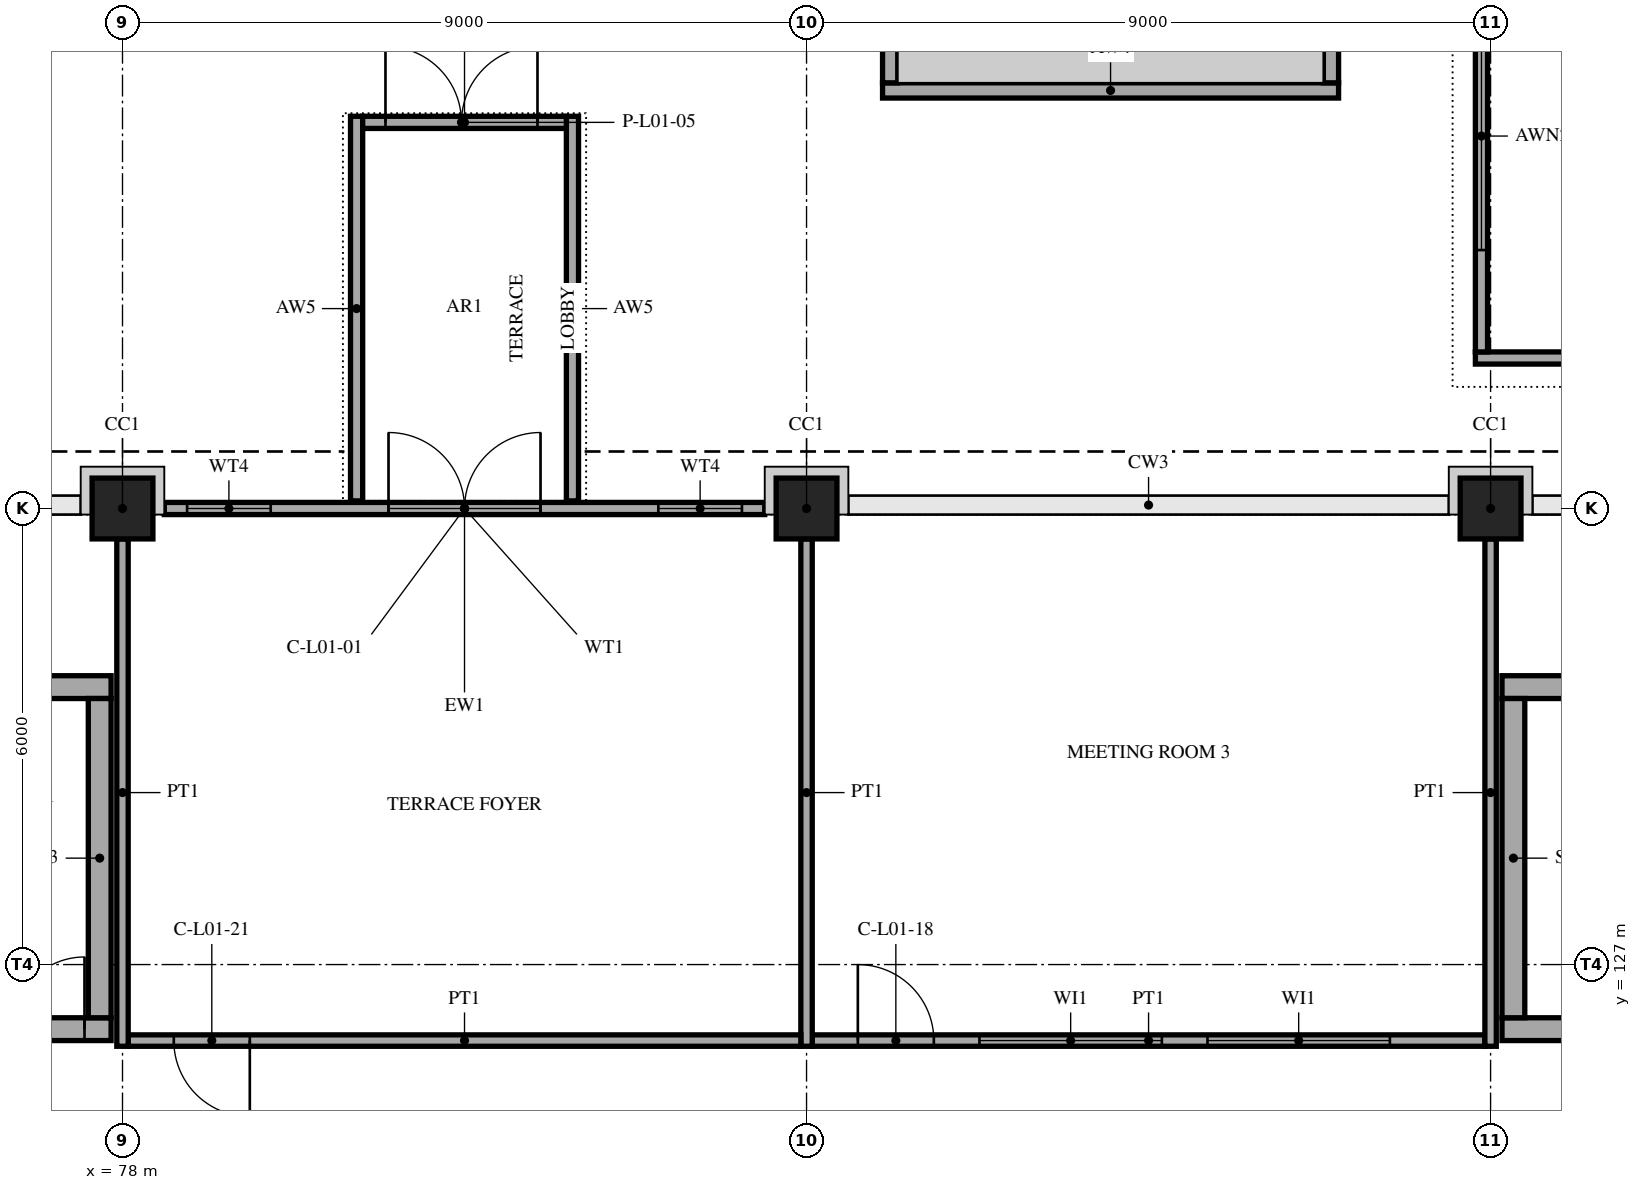
"""IFC4 building model, lengths in metres.
Left out: names, types, materials, properties, quantities, classifications, styles, units other than length and angle.
Written with IfcOpenShell. Run it as: python <this file> out.ifc"""

import sys

from ifc_helpers import new_model, si_unit, direction, frame, frame_2d, origin, origin_2d, place, context, subcontext, project, spatial, rectangle, extrude, element, fill, save


model = new_model("IFC4")
c1 = context("Model", 3, precision=1e-05, world=origin(), true_north=direction((0.0, 1.0)))
c2 = subcontext(c1, "Body", "Model", "MODEL_VIEW")
j1 = project(units=[si_unit("LENGTHUNIT", "METRE"), si_unit("PLANEANGLEUNIT", "RADIAN")], contexts=[c1])
p1 = place(None, origin())
s1 = spatial("IfcSite", under=j1, at=p1, CompositionType="ELEMENT")
p2 = place(p1, origin())
s2 = spatial("IfcBuilding", under=s1, at=p2, CompositionType="ELEMENT")
p3 = place(p2, frame((0.0, 0.0, 5.0)))
s3 = spatial("IfcBuildingStorey", under=s2, at=p3, CompositionType="ELEMENT", Elevation=5.0)
for number, where, z_axis, x_axis in (
    (1, (78.0, 133.0, 0.0), (0.0, 0.0, 1.0), (1.0, 0.0, 0.0)),
    (2, (87.0, 133.0, 0.0), (0.0, 0.0, 1.0), (1.0, 0.0, 0.0)),
    (3, (96.0, 133.0, 0.0), (0.0, 0.0, 1.0), (1.0, 0.0, 0.0)),
):
    element("IfcColumn", number, at=place(p3, frame(where, z_axis=z_axis, x_axis=x_axis)), inside=s3, PredefinedType="COLUMN", context=c2, shape_type="SweptSolid", body=[
        extrude(rectangle(XDim=0.8, YDim=0.8, at=origin_2d()), origin(), (0.0, 0.0, 1.0), 5.0),
    ])
p4 = place(p3, frame((69.15, 126.15, 0.0), z_axis=(0.0, 0.0, 1.0), x_axis=(1.0, 0.0, 0.0)))
e4 = element("IfcWall", 4, at=p4, inside=s3, PredefinedType="SHEAR", context=c2, shape_type="SweptSolid", body=[
    extrude(rectangle(XDim=8.7, YDim=0.3, at=frame_2d((4.35, 0.0))), origin(), (0.0, 0.0, 1.0), 5.0),
])
p5 = place(p4, frame((6.45, 0.0, 0.0)))
e5 = element("IfcOpeningElement", 5, at=p5, cuts=e4, PredefinedType="OPENING", context=c2, shape_type="SweptSolid", body=[
    extrude(rectangle(XDim=1.9, YDim=2.1, at=frame_2d((0.95, 1.05))), frame((0.0, 0.16, 0.0), z_axis=(0.0, -1.0, 0.0), x_axis=(1.0, 0.0, 0.0)), (0.0, 0.0, 1.0), 0.32),
])
p6 = place(p3, frame((69.15, 130.65, 0.0), z_axis=(0.0, 0.0, 1.0), x_axis=(1.0, 0.0, 0.0)))
e6 = element("IfcWall", 6, at=p6, inside=s3, PredefinedType="SHEAR", context=c2, shape_type="SweptSolid", body=[
    extrude(rectangle(XDim=8.7, YDim=0.3, at=frame_2d((4.35, 0.0))), origin(), (0.0, 0.0, 1.0), 5.0),
])
p7 = place(p3, frame((77.7, 126.3, 0.0), z_axis=(0.0, 0.0, 1.0), x_axis=(0.0, 1.0, 0.0)))
e7 = element("IfcWall", 7, at=p7, inside=s3, PredefinedType="SHEAR", context=c2, shape_type="SweptSolid", body=[
    extrude(rectangle(XDim=4.2, YDim=0.3, at=frame_2d((2.1, 0.0))), origin(), (0.0, 0.0, 1.0), 5.0),
])
p8 = place(p3, frame((96.15, 126.15, 0.0), z_axis=(0.0, 0.0, 1.0), x_axis=(1.0, 0.0, 0.0)))
e8 = element("IfcWall", 8, at=p8, inside=s3, PredefinedType="SHEAR", context=c2, shape_type="SweptSolid", body=[
    extrude(rectangle(XDim=8.2, YDim=0.3, at=frame_2d((4.1, 0.0))), origin(), (0.0, 0.0, 1.0), 5.0),
])
p9 = place(p8, frame((5.95, 0.0, 0.0)))
e9 = element("IfcOpeningElement", 9, at=p9, cuts=e8, PredefinedType="OPENING", context=c2, shape_type="SweptSolid", body=[
    extrude(rectangle(XDim=1.9, YDim=2.1, at=frame_2d((0.95, 1.05))), frame((0.0, 0.16, 0.0), z_axis=(0.0, -1.0, 0.0), x_axis=(1.0, 0.0, 0.0)), (0.0, 0.0, 1.0), 0.32),
])
p10 = place(p3, frame((96.15, 130.65, 0.0), z_axis=(0.0, 0.0, 1.0), x_axis=(1.0, 0.0, 0.0)))
e10 = element("IfcWall", 10, at=p10, inside=s3, PredefinedType="SHEAR", context=c2, shape_type="SweptSolid", body=[
    extrude(rectangle(XDim=8.2, YDim=0.3, at=frame_2d((4.1, 0.0))), origin(), (0.0, 0.0, 1.0), 5.0),
])
p11 = place(p3, frame((96.3, 126.3, 0.0), z_axis=(0.0, 0.0, 1.0), x_axis=(0.0, 1.0, 0.0)))
e11 = element("IfcWall", 11, at=p11, inside=s3, PredefinedType="SHEAR", context=c2, shape_type="SweptSolid", body=[
    extrude(rectangle(XDim=4.2, YDim=0.3, at=frame_2d((2.1, 0.0))), origin(), (0.0, 0.0, 1.0), 5.0),
])
p12 = place(p3, frame((78.55, 133.0, 0.0), z_axis=(0.0, 0.0, 1.0), x_axis=(1.0, 0.0, 0.0)))
e12 = element("IfcWall", 12, at=p12, inside=s3, PredefinedType="STANDARD", context=c2, shape_type="SweptSolid", body=[
    extrude(rectangle(XDim=7.9, YDim=0.16, at=frame_2d((3.95, 0.0))), origin(), (0.0, 0.0, 1.0), 5.0),
])
p13 = place(p12, frame((2.95, 0.0, 0.0)))
e13 = element("IfcOpeningElement", 13, at=p13, cuts=e12, PredefinedType="OPENING", context=c2, shape_type="SweptSolid", body=[
    extrude(rectangle(XDim=2.0, YDim=2.4, at=frame_2d((1.0, 1.2))), frame((0.0, 0.09, 0.0), z_axis=(0.0, -1.0, 0.0), x_axis=(1.0, 0.0, 0.0)), (0.0, 0.0, 1.0), 0.18),
])
p14 = place(p12, frame((2.95, 0.0, 2.6)))
e14 = element("IfcOpeningElement", 14, at=p14, cuts=e12, PredefinedType="OPENING", context=c2, shape_type="SweptSolid", body=[
    extrude(rectangle(XDim=2.0, YDim=2.1, at=frame_2d((1.0, 1.05))), frame((0.0, 0.09, 0.0), z_axis=(0.0, -1.0, 0.0), x_axis=(1.0, 0.0, 0.0)), (0.0, 0.0, 1.0), 0.18),
])
p15 = place(p12, frame((0.3, 0.0, 0.9)))
e15 = element("IfcOpeningElement", 15, at=p15, cuts=e12, PredefinedType="OPENING", context=c2, shape_type="SweptSolid", body=[
    extrude(rectangle(XDim=1.1, YDim=3.8, at=frame_2d((0.55, 1.9))), frame((0.0, 0.09, 0.0), z_axis=(0.0, -1.0, 0.0), x_axis=(1.0, 0.0, 0.0)), (0.0, 0.0, 1.0), 0.18),
])
p16 = place(p12, frame((6.5, 0.0, 0.9)))
e16 = element("IfcOpeningElement", 16, at=p16, cuts=e12, PredefinedType="OPENING", context=c2, shape_type="SweptSolid", body=[
    extrude(rectangle(XDim=1.1, YDim=3.8, at=frame_2d((0.55, 1.9))), frame((0.0, 0.09, 0.0), z_axis=(0.0, -1.0, 0.0), x_axis=(1.0, 0.0, 0.0)), (0.0, 0.0, 1.0), 0.18),
])
p17 = place(p3, frame((88.0, 138.5, 0.0), z_axis=(0.0, 0.0, 1.0), x_axis=(1.0, 0.0, 0.0)))
e17 = element("IfcWall", 17, at=p17, inside=s3, PredefinedType="STANDARD", context=c2, shape_type="SweptSolid", body=[
    extrude(rectangle(XDim=6.0, YDim=0.2, at=frame_2d((3.0, 0.0))), origin(), (0.0, 0.0, 1.0), 0.45),
])
for number, where, z_axis, x_axis in (
    (18, (88.1, 138.6, 0.0), (0.0, 0.0, 1.0), (0.0, 1.0, 0.0)),
    (19, (93.9, 138.6, 0.0), (0.0, 0.0, 1.0), (0.0, 1.0, 0.0)),
):
    element("IfcWall", number, at=place(p3, frame(where, z_axis=z_axis, x_axis=x_axis)), inside=s3, PredefinedType="STANDARD", context=c2, shape_type="SweptSolid", body=[
        extrude(rectangle(XDim=2.6, YDim=0.2, at=frame_2d((1.3, 0.0))), origin(), (0.0, 0.0, 1.0), 0.45),
    ])
p18 = place(p3, frame((95.8, 134.98, 0.0), z_axis=(0.0, 0.0, 1.0), x_axis=(1.0, 0.0, 0.0)))
e20 = element("IfcWall", 20, at=p18, inside=s3, PredefinedType="STANDARD", context=c2, shape_type="SweptSolid", body=[
    extrude(rectangle(XDim=36.4, YDim=0.16, at=frame_2d((18.2, 0.0))), origin(), (0.0, 0.0, 1.0), 2.6),
])
p19 = place(p18, frame((10.7, 0.0, 0.0)))
e21 = element("IfcOpeningElement", 21, at=p19, cuts=e20, PredefinedType="OPENING", context=c2, shape_type="SweptSolid", body=[
    extrude(rectangle(XDim=2.0, YDim=2.4, at=frame_2d((1.0, 1.2))), frame((0.0, 0.09, 0.0), z_axis=(0.0, -1.0, 0.0), x_axis=(1.0, 0.0, 0.0)), (0.0, 0.0, 1.0), 0.18),
])
p20 = place(p18, frame((19.7, 0.0, 0.0)))
e22 = element("IfcOpeningElement", 22, at=p20, cuts=e20, PredefinedType="OPENING", context=c2, shape_type="SweptSolid", body=[
    extrude(rectangle(XDim=2.0, YDim=2.4, at=frame_2d((1.0, 1.2))), frame((0.0, 0.09, 0.0), z_axis=(0.0, -1.0, 0.0), x_axis=(1.0, 0.0, 0.0)), (0.0, 0.0, 1.0), 0.18),
])
p21 = place(p18, frame((2.2, 0.0, 0.8)))
e23 = element("IfcOpeningElement", 23, at=p21, cuts=e20, PredefinedType="OPENING", context=c2, shape_type="SweptSolid", body=[
    extrude(rectangle(XDim=3.0, YDim=2.0, at=frame_2d((1.5, 1.0))), frame((0.0, 0.09, 0.0), z_axis=(0.0, -1.0, 0.0), x_axis=(1.0, 0.0, 0.0)), (0.0, 0.0, 1.0), 0.18),
])
p22 = place(p18, frame((13.7, 0.0, 0.8)))
e24 = element("IfcOpeningElement", 24, at=p22, cuts=e20, PredefinedType="OPENING", context=c2, shape_type="SweptSolid", body=[
    extrude(rectangle(XDim=3.0, YDim=2.0, at=frame_2d((1.5, 1.0))), frame((0.0, 0.09, 0.0), z_axis=(0.0, -1.0, 0.0), x_axis=(1.0, 0.0, 0.0)), (0.0, 0.0, 1.0), 0.18),
])
p23 = place(p18, frame((22.2, 0.0, 0.8)))
e25 = element("IfcOpeningElement", 25, at=p23, cuts=e20, PredefinedType="OPENING", context=c2, shape_type="SweptSolid", body=[
    extrude(rectangle(XDim=3.0, YDim=2.0, at=frame_2d((1.5, 1.0))), frame((0.0, 0.09, 0.0), z_axis=(0.0, -1.0, 0.0), x_axis=(1.0, 0.0, 0.0)), (0.0, 0.0, 1.0), 0.18),
])
p24 = place(p18, frame((27.7, 0.0, 0.8)))
e26 = element("IfcOpeningElement", 26, at=p24, cuts=e20, PredefinedType="OPENING", context=c2, shape_type="SweptSolid", body=[
    extrude(rectangle(XDim=2.5, YDim=2.0, at=frame_2d((1.25, 1.0))), frame((0.0, 0.09, 0.0), z_axis=(0.0, -1.0, 0.0), x_axis=(1.0, 0.0, 0.0)), (0.0, 0.0, 1.0), 0.18),
])
p25 = place(p18, frame((32.7, 0.0, 0.8)))
e27 = element("IfcOpeningElement", 27, at=p25, cuts=e20, PredefinedType="OPENING", context=c2, shape_type="SweptSolid", body=[
    extrude(rectangle(XDim=2.5, YDim=2.0, at=frame_2d((1.25, 1.0))), frame((0.0, 0.09, 0.0), z_axis=(0.0, -1.0, 0.0), x_axis=(1.0, 0.0, 0.0)), (0.0, 0.0, 1.0), 0.18),
])
p26 = place(p3, frame((95.88, 135.06, 0.0), z_axis=(0.0, 0.0, 1.0), x_axis=(0.0, 1.0, 0.0)))
e28 = element("IfcWall", 28, at=p26, inside=s3, PredefinedType="STANDARD", context=c2, shape_type="SweptSolid", body=[
    extrude(rectangle(XDim=8.28, YDim=0.16, at=frame_2d((4.14, 0.0))), origin(), (0.0, 0.0, 1.0), 2.6),
])
p27 = place(p26, frame((1.34, 0.0, 0.8)))
e29 = element("IfcOpeningElement", 29, at=p27, cuts=e28, PredefinedType="OPENING", context=c2, shape_type="SweptSolid", body=[
    extrude(rectangle(XDim=3.0, YDim=2.0, at=frame_2d((1.5, 1.0))), frame((0.0, 0.09, 0.0), z_axis=(0.0, -1.0, 0.0), x_axis=(1.0, 0.0, 0.0)), (0.0, 0.0, 1.0), 0.18),
])
p28 = place(p26, frame((4.79, 0.0, 0.8)))
e30 = element("IfcOpeningElement", 30, at=p28, cuts=e28, PredefinedType="OPENING", context=c2, shape_type="SweptSolid", body=[
    extrude(rectangle(XDim=3.0, YDim=2.0, at=frame_2d((1.5, 1.0))), frame((0.0, 0.09, 0.0), z_axis=(0.0, -1.0, 0.0), x_axis=(1.0, 0.0, 0.0)), (0.0, 0.0, 1.0), 0.18),
])
for number, where, z_axis, x_axis in (
    (31, (81.08, 133.1, 0.0), (0.0, 0.0, 1.0), (0.0, 1.0, 0.0)),
    (32, (83.92, 133.1, 0.0), (0.0, 0.0, 1.0), (0.0, 1.0, 0.0)),
):
    element("IfcWall", number, at=place(p3, frame(where, z_axis=z_axis, x_axis=x_axis)), inside=s3, PredefinedType="STANDARD", context=c2, shape_type="SweptSolid", body=[
        extrude(rectangle(XDim=5.06, YDim=0.16, at=frame_2d((2.53, 0.0))), origin(), (0.0, 0.0, 1.0), 2.6),
    ])
p29 = place(p3, frame((81.16, 138.08, 0.0), z_axis=(0.0, 0.0, 1.0), x_axis=(1.0, 0.0, 0.0)))
e33 = element("IfcWall", 33, at=p29, inside=s3, PredefinedType="STANDARD", context=c2, shape_type="SweptSolid", body=[
    extrude(rectangle(XDim=2.68, YDim=0.16, at=frame_2d((1.34, 0.0))), origin(), (0.0, 0.0, 1.0), 2.6),
])
p30 = place(p29, frame((0.3, 0.0, 0.0)))
e34 = element("IfcOpeningElement", 34, at=p30, cuts=e33, PredefinedType="OPENING", context=c2, shape_type="SweptSolid", body=[
    extrude(rectangle(XDim=2.0, YDim=2.4, at=frame_2d((1.0, 1.2))), frame((0.0, 0.09, 0.0), z_axis=(0.0, -1.0, 0.0), x_axis=(1.0, 0.0, 0.0)), (0.0, 0.0, 1.0), 0.18),
])
p31 = place(p3, frame((87.075, 126.0, 0.0), z_axis=(0.0, 0.0, 1.0), x_axis=(1.0, 0.0, 0.0)))
e35 = element("IfcWall", 35, at=p31, inside=s3, PredefinedType="PARTITIONING", context=c2, shape_type="SweptSolid", body=[
    extrude(rectangle(XDim=8.85, YDim=0.15, at=frame_2d((4.425, 0.0))), origin(), (0.0, 0.0, 1.0), 4.8),
])
p32 = place(p31, frame((0.6, 0.0, 0.0)))
e36 = element("IfcOpeningElement", 36, at=p32, cuts=e35, PredefinedType="OPENING", context=c2, shape_type="SweptSolid", body=[
    extrude(rectangle(XDim=1.0, YDim=2.1, at=frame_2d((0.5, 1.05))), frame((0.0, 0.085, 0.0), z_axis=(0.0, -1.0, 0.0), x_axis=(1.0, 0.0, 0.0)), (0.0, 0.0, 1.0), 0.17),
])
p33 = place(p31, frame((2.2, 0.0, 0.9)))
e37 = element("IfcOpeningElement", 37, at=p33, cuts=e35, PredefinedType="OPENING", context=c2, shape_type="SweptSolid", body=[
    extrude(rectangle(XDim=2.4, YDim=1.5, at=frame_2d((1.2, 0.75))), frame((0.0, 0.085, 0.0), z_axis=(0.0, -1.0, 0.0), x_axis=(1.0, 0.0, 0.0)), (0.0, 0.0, 1.0), 0.17),
])
p34 = place(p31, frame((5.2, 0.0, 0.9)))
e38 = element("IfcOpeningElement", 38, at=p34, cuts=e35, PredefinedType="OPENING", context=c2, shape_type="SweptSolid", body=[
    extrude(rectangle(XDim=2.4, YDim=1.5, at=frame_2d((1.2, 0.75))), frame((0.0, 0.085, 0.0), z_axis=(0.0, -1.0, 0.0), x_axis=(1.0, 0.0, 0.0)), (0.0, 0.0, 1.0), 0.17),
])
for number, where, z_axis, x_axis in (
    (39, (87.0, 125.925, 0.0), (0.0, 0.0, 1.0), (0.0, 1.0, 0.0)),
    (40, (96.0, 125.925, 0.0), (0.0, 0.0, 1.0), (0.0, 1.0, 0.0)),
):
    element("IfcWall", number, at=place(p3, frame(where, z_axis=z_axis, x_axis=x_axis)), inside=s3, PredefinedType="PARTITIONING", context=c2, shape_type="SweptSolid", body=[
        extrude(rectangle(XDim=6.675, YDim=0.15, at=frame_2d((3.337, 0.0))), origin(), (0.0, 0.0, 1.0), 4.0),
    ])
p35 = place(p3, frame((78.075, 126.0, 0.0), z_axis=(0.0, 0.0, 1.0), x_axis=(1.0, 0.0, 0.0)))
e41 = element("IfcWall", 41, at=p35, inside=s3, PredefinedType="PARTITIONING", context=c2, shape_type="SweptSolid", body=[
    extrude(rectangle(XDim=8.85, YDim=0.15, at=frame_2d((4.425, 0.0))), origin(), (0.0, 0.0, 1.0), 4.8),
])
p36 = place(p35, frame((0.6, 0.0, 0.0)))
e42 = element("IfcOpeningElement", 42, at=p36, cuts=e41, PredefinedType="OPENING", context=c2, shape_type="SweptSolid", body=[
    extrude(rectangle(XDim=1.0, YDim=2.1, at=frame_2d((0.5, 1.05))), frame((0.0, 0.085, 0.0), z_axis=(0.0, -1.0, 0.0), x_axis=(1.0, 0.0, 0.0)), (0.0, 0.0, 1.0), 0.17),
])
p37 = place(p3, frame((78.0, 125.925, 0.0), z_axis=(0.0, 0.0, 1.0), x_axis=(0.0, 1.0, 0.0)))
e43 = element("IfcWall", 43, at=p37, inside=s3, PredefinedType="PARTITIONING", context=c2, shape_type="SweptSolid", body=[
    extrude(rectangle(XDim=6.675, YDim=0.15, at=frame_2d((3.337, 0.0))), origin(), (0.0, 0.0, 1.0), 4.0),
])
p38 = place(p13, origin())
e44 = element("IfcDoor", 44, at=p38, inside=s3, OperationType="DOUBLE_DOOR_SINGLE_SWING", PredefinedType="NOTDEFINED", context=c2, shape_type="SweptSolid", body=[
    extrude(rectangle(XDim=2.0, YDim=2.4, at=frame_2d((1.0, 1.2))), frame((0.0, 0.025, 0.0), z_axis=(0.0, -1.0, 0.0), x_axis=(1.0, 0.0, 0.0)), (0.0, 0.0, 1.0), 0.05),
])
fill(e13, e44)
p39 = place(p14, origin())
e45 = element("IfcWindow", 45, at=p39, inside=s3, PartitioningType="SINGLE_PANEL", PredefinedType="WINDOW", context=c2, shape_type="SweptSolid", body=[
    extrude(rectangle(XDim=2.0, YDim=2.1, at=frame_2d((1.0, 1.05))), frame((0.0, 0.03, 0.0), z_axis=(0.0, -1.0, 0.0), x_axis=(1.0, 0.0, 0.0)), (0.0, 0.0, 1.0), 0.06),
])
fill(e14, e45)
p40 = place(p15, origin())
e46 = element("IfcWindow", 46, at=p40, inside=s3, PartitioningType="SINGLE_PANEL", PredefinedType="WINDOW", context=c2, shape_type="SweptSolid", body=[
    extrude(rectangle(XDim=1.1, YDim=3.8, at=frame_2d((0.55, 1.9))), frame((0.0, 0.03, 0.0), z_axis=(0.0, -1.0, 0.0), x_axis=(1.0, 0.0, 0.0)), (0.0, 0.0, 1.0), 0.06),
])
fill(e15, e46)
p41 = place(p16, origin())
e47 = element("IfcWindow", 47, at=p41, inside=s3, PartitioningType="SINGLE_PANEL", PredefinedType="WINDOW", context=c2, shape_type="SweptSolid", body=[
    extrude(rectangle(XDim=1.1, YDim=3.8, at=frame_2d((0.55, 1.9))), frame((0.0, 0.03, 0.0), z_axis=(0.0, -1.0, 0.0), x_axis=(1.0, 0.0, 0.0)), (0.0, 0.0, 1.0), 0.06),
])
fill(e16, e47)
p42 = place(p27, origin())
e48 = element("IfcWindow", 48, at=p42, inside=s3, PartitioningType="SINGLE_PANEL", PredefinedType="WINDOW", context=c2, shape_type="SweptSolid", body=[
    extrude(rectangle(XDim=3.0, YDim=2.0, at=frame_2d((1.5, 1.0))), frame((0.0, 0.03, 0.0), z_axis=(0.0, -1.0, 0.0), x_axis=(1.0, 0.0, 0.0)), (0.0, 0.0, 1.0), 0.06),
])
fill(e29, e48)
p43 = place(p30, origin())
e49 = element("IfcDoor", 49, at=p43, inside=s3, OperationType="DOUBLE_DOOR_SINGLE_SWING", PredefinedType="NOTDEFINED", context=c2, shape_type="SweptSolid", body=[
    extrude(rectangle(XDim=2.0, YDim=2.4, at=frame_2d((1.0, 1.2))), frame((0.0, 0.025, 0.0), z_axis=(0.0, -1.0, 0.0), x_axis=(1.0, 0.0, 0.0)), (0.0, 0.0, 1.0), 0.05),
])
fill(e34, e49)
p44 = place(p5, origin())
e50 = element("IfcDoor", 50, at=p44, inside=s3, OperationType="DOUBLE_DOOR_SINGLE_SWING", PredefinedType="NOTDEFINED", context=c2, shape_type="SweptSolid", body=[
    extrude(rectangle(XDim=1.9, YDim=2.1, at=frame_2d((0.95, 1.05))), frame((0.0, 0.025, 0.0), z_axis=(0.0, -1.0, 0.0), x_axis=(1.0, 0.0, 0.0)), (0.0, 0.0, 1.0), 0.05),
])
fill(e5, e50)
p45 = place(p32, origin())
e51 = element("IfcDoor", 51, at=p45, inside=s3, OperationType="SINGLE_SWING_LEFT", PredefinedType="NOTDEFINED", context=c2, shape_type="SweptSolid", body=[
    extrude(rectangle(XDim=1.0, YDim=2.1, at=frame_2d((0.5, 1.05))), frame((0.0, 0.025, 0.0), z_axis=(0.0, -1.0, 0.0), x_axis=(1.0, 0.0, 0.0)), (0.0, 0.0, 1.0), 0.05),
])
fill(e36, e51)
p46 = place(p33, origin())
e52 = element("IfcWindow", 52, at=p46, inside=s3, PartitioningType="SINGLE_PANEL", PredefinedType="WINDOW", context=c2, shape_type="SweptSolid", body=[
    extrude(rectangle(XDim=2.4, YDim=1.5, at=frame_2d((1.2, 0.75))), frame((0.0, 0.03, 0.0), z_axis=(0.0, -1.0, 0.0), x_axis=(1.0, 0.0, 0.0)), (0.0, 0.0, 1.0), 0.06),
])
fill(e37, e52)
p47 = place(p34, origin())
e53 = element("IfcWindow", 53, at=p47, inside=s3, PartitioningType="SINGLE_PANEL", PredefinedType="WINDOW", context=c2, shape_type="SweptSolid", body=[
    extrude(rectangle(XDim=2.4, YDim=1.5, at=frame_2d((1.2, 0.75))), frame((0.0, 0.03, 0.0), z_axis=(0.0, -1.0, 0.0), x_axis=(1.0, 0.0, 0.0)), (0.0, 0.0, 1.0), 0.06),
])
fill(e38, e53)
p48 = place(p36, frame((1.0, 0.0, 0.0), z_axis=(0.0, 0.0, 1.0), x_axis=(-1.0, 0.0, 0.0)))
e54 = element("IfcDoor", 54, at=p48, inside=s3, OperationType="SINGLE_SWING_LEFT", PredefinedType="NOTDEFINED", context=c2, shape_type="SweptSolid", body=[
    extrude(rectangle(XDim=1.0, YDim=2.1, at=frame_2d((0.5, 1.05))), frame((0.0, 0.025, 0.0), z_axis=(0.0, -1.0, 0.0), x_axis=(1.0, 0.0, 0.0)), (0.0, 0.0, 1.0), 0.05),
])
fill(e42, e54)
save(model, sys.argv[1])
